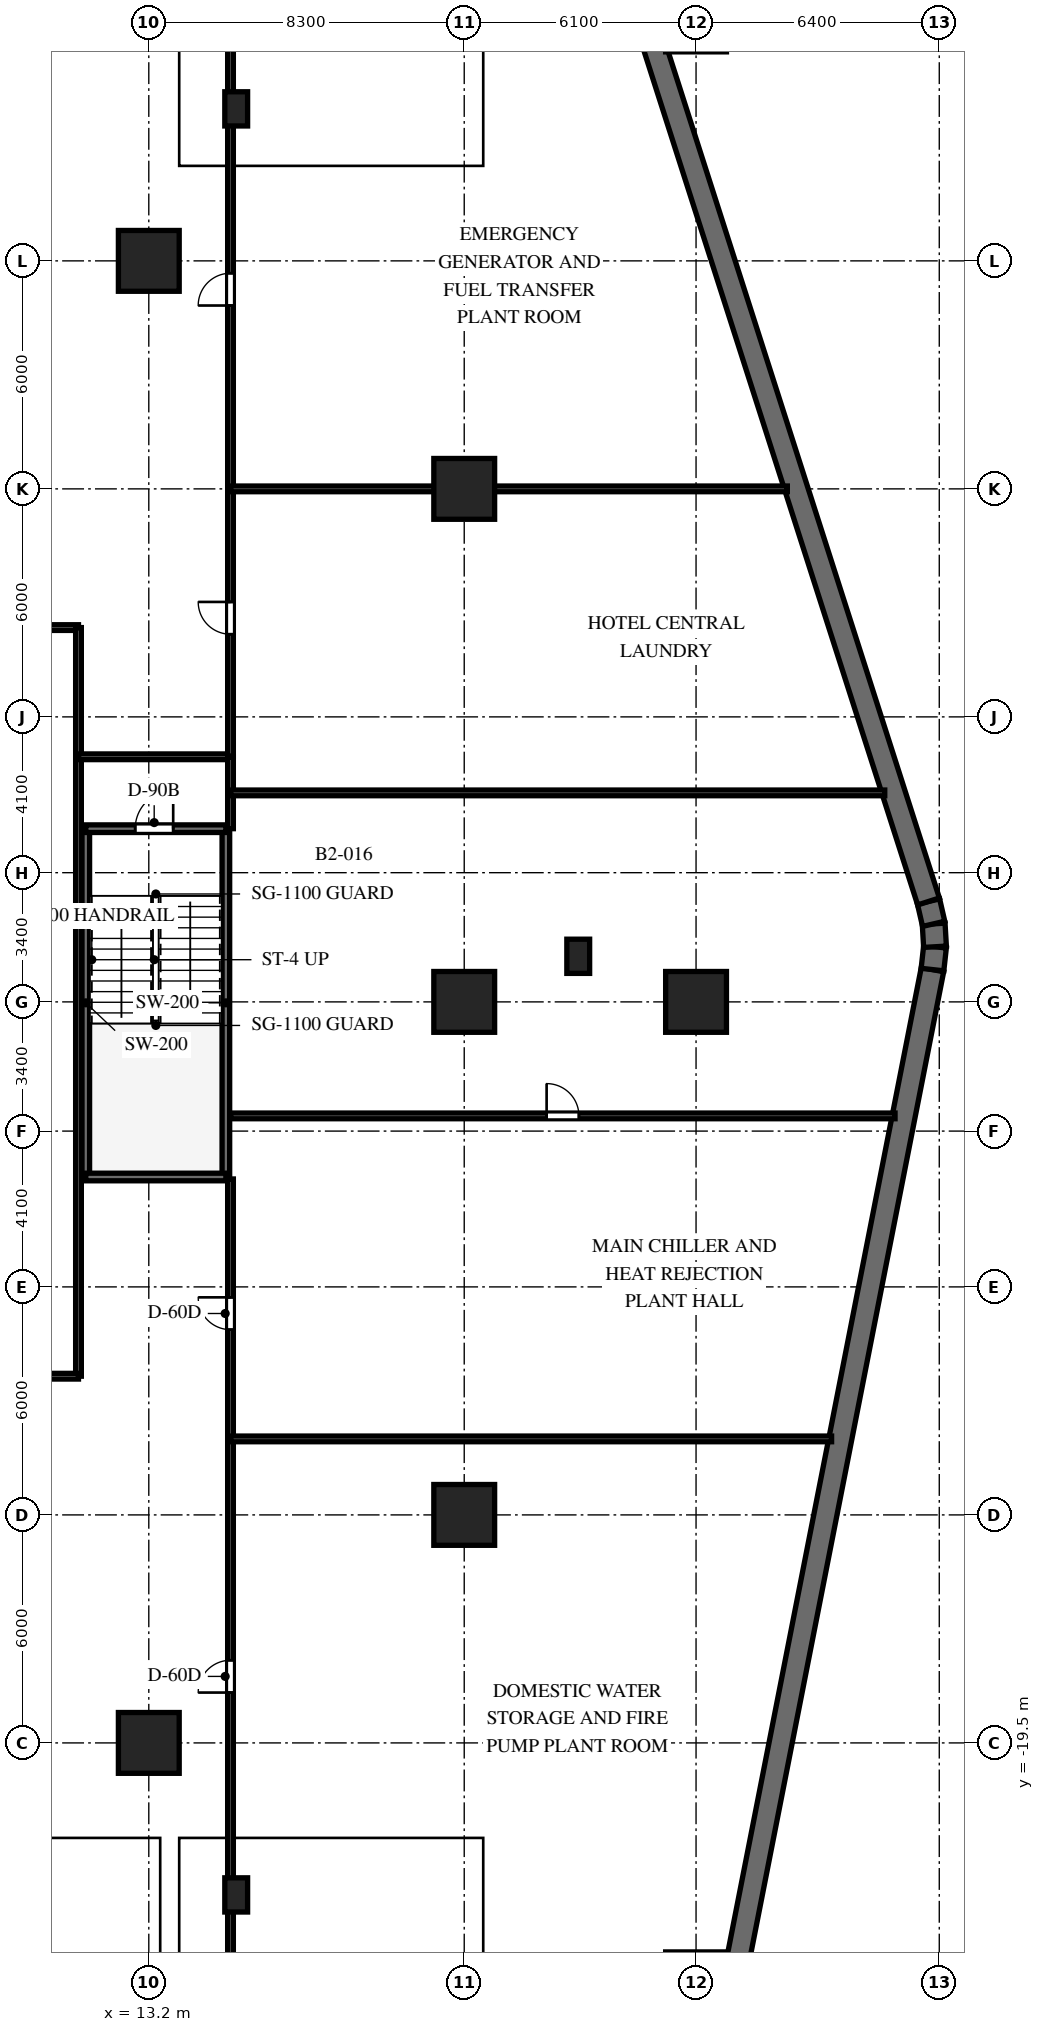
"""IFC4 building model, lengths in metres.
Left out: names, types, materials, properties, quantities, classifications, styles, units other than length and angle.
Written with IfcOpenShell. Run it as: python <this file> out.ifc"""

import sys

from ifc_helpers import new_model, si_unit, direction, frame, frame_2d, origin, origin_2d, place, context, subcontext, project, spatial, rectangle, extrude, element, fill, save


model = new_model("IFC4")
c1 = context("Model", 3, precision=1e-05, world=origin(), true_north=direction((0.0, 1.0)))
c2 = subcontext(c1, "Body", "Model", "MODEL_VIEW")
j1 = project(units=[si_unit("LENGTHUNIT", "METRE"), si_unit("PLANEANGLEUNIT", "RADIAN")], contexts=[c1])
p1 = place(None, origin())
s1 = spatial("IfcSite", under=j1, at=p1, CompositionType="ELEMENT")
p2 = place(p1, origin())
s2 = spatial("IfcBuilding", under=s1, at=p2, CompositionType="ELEMENT")
p3 = place(p2, frame((0.0, 0.0, -9.0)))
s3 = spatial("IfcBuildingStorey", under=s2, at=p3, CompositionType="ELEMENT", Elevation=-9.0)
for number, where, z_axis, x_axis in (
    (1, (11.542, -4.608, 0.0), (0.0, 0.0, 1.0), (0.0, 1.0, 0.0)),
    (2, (15.228, -4.608, 0.0), (0.0, 0.0, 1.0), (0.0, 1.0, 0.0)),
):
    element("IfcWall", number, at=place(p3, frame(where, z_axis=z_axis, x_axis=x_axis)), inside=s3, PredefinedType="SHEAR", context=c2, shape_type="SweptSolid", body=[
        extrude(rectangle(XDim=9.166, YDim=0.2, at=frame_2d((4.583, 0.0))), origin(), (0.0, 0.0, 1.0), 4.5),
    ])
p4 = place(p3, frame((11.542, -4.608, 0.0), z_axis=(0.0, 0.0, 1.0), x_axis=(1.0, 0.0, 0.0)))
e3 = element("IfcWall", 3, at=p4, inside=s3, PredefinedType="SHEAR", context=c2, shape_type="SweptSolid", body=[
    extrude(rectangle(XDim=3.686, YDim=0.2, at=frame_2d((1.843, 0.0))), origin(), (0.0, 0.0, 1.0), 4.5),
])
p5 = place(p3, frame((11.542, 4.558, 0.0), z_axis=(0.0, 0.0, 1.0), x_axis=(1.0, 0.0, 0.0)))
e4 = element("IfcWall", 4, at=p5, inside=s3, PredefinedType="SHEAR", context=c2, shape_type="SweptSolid", body=[
    extrude(rectangle(XDim=3.686, YDim=0.2, at=frame_2d((1.843, 0.0))), origin(), (0.0, 0.0, 1.0), 4.5),
])
p6 = place(p5, frame((1.3, 0.0, 0.0)))
e5 = element("IfcOpeningElement", 5, at=p6, cuts=e4, PredefinedType="OPENING", context=c2, shape_type="SweptSolid", body=[
    extrude(rectangle(XDim=1.0, YDim=2.15, at=frame_2d((0.5, 1.075))), frame((0.0, 0.11, 0.0), z_axis=(0.0, -1.0, 0.0), x_axis=(1.0, 0.0, 0.0)), (0.0, 0.0, 1.0), 0.22),
])
p7 = place(p3, frame((27.941, -29.094, 0.0), z_axis=(0.0, 0.0, 1.0), x_axis=(0.192705549984, 0.981256628515, 0.0)))
e6 = element("IfcWall", 6, at=p7, inside=s3, PredefinedType="SHEAR", context=c2, shape_type="SweptSolid", body=[
    extrude(rectangle(XDim=30.516, YDim=0.6, at=frame_2d((15.258, 0.0))), origin(), (0.0, 0.0, 1.0), 4.5),
])
p8 = place(p3, frame((33.821, 0.85, 0.0), z_axis=(0.0, 0.0, 1.0), x_axis=(0.109899357688, 0.993942720271, 0.0)))
e7 = element("IfcWall", 7, at=p8, inside=s3, PredefinedType="SHEAR", context=c2, shape_type="SweptSolid", body=[
    extrude(rectangle(XDim=0.604, YDim=0.6, at=frame_2d((0.302, 0.0))), origin(), (0.0, 0.0, 1.0), 4.5),
])
for number, where, z_axis, x_axis in (
    (8, (33.888, 1.451, 0.0), (0.0, 0.0, 1.0), (-0.058, 0.998, 0.0)),
    (9, (33.853, 2.054, 0.0), (0.0, 0.0, 1.0), (-0.224, 0.975, 0.0)),
):
    element("IfcWall", number, at=place(p3, frame(where, z_axis=z_axis, x_axis=x_axis)), inside=s3, PredefinedType="SHEAR", context=c2, shape_type="SweptSolid", body=[
        extrude(rectangle(XDim=0.604, YDim=0.6, at=frame_2d((0.302, 0.0))), origin(), (0.0, 0.0, 1.0), 4.5),
    ])
p9 = place(p3, frame((33.717, 2.643, 0.0), z_axis=(0.0, 0.0, 1.0), x_axis=(-0.305147622554, 0.952305060603, 0.0)))
e10 = element("IfcWall", 10, at=p9, inside=s3, PredefinedType="SHEAR", context=c2, shape_type="SweptSolid", body=[
    extrude(rectangle(XDim=28.201, YDim=0.6, at=frame_2d((14.101, 0.0))), origin(), (0.0, 0.0, 1.0), 4.5),
])
for number, where, z_axis, x_axis in (
    (11, (21.5, -13.5, 0.0), (0.0, 0.0, 1.0), (1.0, 0.0, 0.0)),
    (12, (21.5, 0.0, 0.0), (0.0, 0.0, 1.0), (1.0, 0.0, 0.0)),
    (13, (21.5, 13.5, 0.0), (0.0, 0.0, 1.0), (1.0, 0.0, 0.0)),
    (14, (13.2, -19.5, 0.0), (0.0, 0.0, 1.0), (1.0, 0.0, 0.0)),
    (15, (13.2, 19.5, 0.0), (0.0, 0.0, 1.0), (1.0, 0.0, 0.0)),
    (16, (27.6, 0.0, 0.0), (0.0, 0.0, 1.0), (1.0, 0.0, 0.0)),
):
    element("IfcColumn", number, at=place(p3, frame(where, z_axis=z_axis, x_axis=x_axis)), inside=s3, PredefinedType="COLUMN", context=c2, shape_type="SweptSolid", body=[
        extrude(rectangle(XDim=1.6, YDim=1.6, at=origin_2d()), origin(), (0.0, 0.0, 1.0), 4.5),
    ])
for number, where, z_axis, x_axis in (
    (17, (15.5, -23.5, 0.0), (0.0, 0.0, 1.0), (1.0, 0.0, 0.0)),
    (18, (24.5, 1.2, 0.0), (0.0, 0.0, 1.0), (1.0, 0.0, 0.0)),
    (19, (15.5, 23.5, 0.0), (0.0, 0.0, 1.0), (1.0, 0.0, 0.0)),
):
    element("IfcColumn", number, at=place(p3, frame(where, z_axis=z_axis, x_axis=x_axis)), inside=s3, PredefinedType="PILASTER", context=c2, shape_type="SweptSolid", body=[
        extrude(rectangle(XDim=0.6, YDim=0.9, at=origin_2d()), origin(), (0.0, 0.0, 1.0), 4.5),
    ])
p10 = place(p3, frame((-11.35, 9.85, 0.0), z_axis=(0.0, 0.0, 1.0), x_axis=(1.0, 0.0, 0.0)))
e20 = element("IfcWall", 20, at=p10, inside=s3, PredefinedType="PARTITIONING", context=c2, shape_type="SweptSolid", body=[
    extrude(rectangle(XDim=22.7, YDim=0.15, at=frame_2d((11.35, 0.0))), origin(), (0.0, 0.0, 1.0), 3.17),
])
p11 = place(p3, frame((11.35, 9.85, 0.0), z_axis=(0.0, 0.0, 1.0), x_axis=(0.0, -1.0, 0.0)))
e21 = element("IfcWall", 21, at=p11, inside=s3, PredefinedType="PARTITIONING", context=c2, shape_type="SweptSolid", body=[
    extrude(rectangle(XDim=19.7, YDim=0.15, at=frame_2d((9.85, 0.0))), origin(), (0.0, 0.0, 1.0), 3.17),
])
p12 = place(p3, frame((11.35, -9.85, 0.0), z_axis=(0.0, 0.0, 1.0), x_axis=(-1.0, 0.0, 0.0)))
e22 = element("IfcWall", 22, at=p12, inside=s3, PredefinedType="PARTITIONING", context=c2, shape_type="SweptSolid", body=[
    extrude(rectangle(XDim=22.7, YDim=0.15, at=frame_2d((11.35, 0.0))), origin(), (0.0, 0.0, 1.0), 3.17),
])
p13 = place(p3, frame((11.35, 6.45, 0.0), z_axis=(0.0, 0.0, 1.0), x_axis=(1.0, 0.0, 0.0)))
e23 = element("IfcWall", 23, at=p13, inside=s3, PredefinedType="PARTITIONING", context=c2, shape_type="SweptSolid", body=[
    extrude(rectangle(XDim=4.0, YDim=0.15, at=frame_2d((2.0, 0.0))), origin(), (0.0, 0.0, 1.0), 4.18),
])
p14 = place(p3, frame((15.35, 4.558, 0.0), z_axis=(0.0, 0.0, 1.0), x_axis=(0.0, 1.0, 0.0)))
e24 = element("IfcWall", 24, at=p14, inside=s3, PredefinedType="PARTITIONING", context=c2, shape_type="SweptSolid", body=[
    extrude(rectangle(XDim=1.892, YDim=0.15, at=frame_2d((0.946, 0.0))), origin(), (0.0, 0.0, 1.0), 4.18),
])
p15 = place(p3, frame((15.35, -25.5, 0.0), z_axis=(0.0, 0.0, 1.0), x_axis=(0.0, 1.0, 0.0)))
e25 = element("IfcWall", 25, at=p15, inside=s3, PredefinedType="PARTITIONING", context=c2, shape_type="SweptSolid", body=[
    extrude(rectangle(XDim=20.84, YDim=0.15, at=frame_2d((10.42, 0.0))), origin(), (0.0, 0.0, 1.0), 3.17),
])
p16 = place(p15, frame((7.325, 0.0, 0.0)))
e26 = element("IfcOpeningElement", 26, at=p16, cuts=e25, PredefinedType="OPENING", context=c2, shape_type="SweptSolid", body=[
    extrude(rectangle(XDim=0.85, YDim=2.03, at=frame_2d((0.425, 1.015))), frame((0.0, 0.085, 0.0), z_axis=(0.0, -1.0, 0.0), x_axis=(1.0, 0.0, 0.0)), (0.0, 0.0, 1.0), 0.17),
])
p17 = place(p15, frame((16.875, 0.0, 0.0)))
e27 = element("IfcOpeningElement", 27, at=p17, cuts=e25, PredefinedType="OPENING", context=c2, shape_type="SweptSolid", body=[
    extrude(rectangle(XDim=0.85, YDim=2.03, at=frame_2d((0.425, 1.015))), frame((0.0, 0.085, 0.0), z_axis=(0.0, -1.0, 0.0), x_axis=(1.0, 0.0, 0.0)), (0.0, 0.0, 1.0), 0.17),
])
p18 = place(p3, frame((15.35, 6.46, 0.0), z_axis=(0.0, 0.0, 1.0), x_axis=(0.0, 1.0, 0.0)))
e28 = element("IfcWall", 28, at=p18, inside=s3, PredefinedType="PARTITIONING", context=c2, shape_type="SweptSolid", body=[
    extrude(rectangle(XDim=19.04, YDim=0.15, at=frame_2d((9.52, 0.0))), origin(), (0.0, 0.0, 1.0), 3.17),
])
p19 = place(p18, frame((3.215, 0.0, 0.0)))
e29 = element("IfcOpeningElement", 29, at=p19, cuts=e28, PredefinedType="OPENING", context=c2, shape_type="SweptSolid", body=[
    extrude(rectangle(XDim=0.85, YDim=2.03, at=frame_2d((0.425, 1.015))), frame((0.0, 0.085, 0.0), z_axis=(0.0, -1.0, 0.0), x_axis=(1.0, 0.0, 0.0)), (0.0, 0.0, 1.0), 0.17),
])
p20 = place(p18, frame((11.865, 0.0, 0.0)))
e30 = element("IfcOpeningElement", 30, at=p20, cuts=e28, PredefinedType="OPENING", context=c2, shape_type="SweptSolid", body=[
    extrude(rectangle(XDim=0.85, YDim=2.03, at=frame_2d((0.425, 1.015))), frame((0.0, 0.085, 0.0), z_axis=(0.0, -1.0, 0.0), x_axis=(1.0, 0.0, 0.0)), (0.0, 0.0, 1.0), 0.17),
])
p21 = place(p3, frame((15.35, -11.5, 0.0), z_axis=(0.0, 0.0, 1.0), x_axis=(1.0, 0.0, 0.0)))
e31 = element("IfcWall", 31, at=p21, inside=s3, PredefinedType="PARTITIONING", context=c2, shape_type="SweptSolid", body=[
    extrude(rectangle(XDim=15.816, YDim=0.15, at=frame_2d((7.908, 0.0))), origin(), (0.0, 0.0, 1.0), 3.17),
])
p22 = place(p3, frame((15.35, -3.0, 0.0), z_axis=(0.0, 0.0, 1.0), x_axis=(1.0, 0.0, 0.0)))
e32 = element("IfcWall", 32, at=p22, inside=s3, PredefinedType="PARTITIONING", context=c2, shape_type="SweptSolid", body=[
    extrude(rectangle(XDim=17.486, YDim=0.15, at=frame_2d((8.743, 0.0))), origin(), (0.0, 0.0, 1.0), 3.17),
])
p23 = place(p22, frame((8.318, 0.0, 0.0)))
e33 = element("IfcOpeningElement", 33, at=p23, cuts=e32, PredefinedType="OPENING", context=c2, shape_type="SweptSolid", body=[
    extrude(rectangle(XDim=0.85, YDim=2.03, at=frame_2d((0.425, 1.015))), frame((0.0, 0.085, 0.0), z_axis=(0.0, -1.0, 0.0), x_axis=(1.0, 0.0, 0.0)), (0.0, 0.0, 1.0), 0.17),
])
p24 = place(p3, frame((15.35, 5.5, 0.0), z_axis=(0.0, 0.0, 1.0), x_axis=(1.0, 0.0, 0.0)))
e34 = element("IfcWall", 34, at=p24, inside=s3, PredefinedType="PARTITIONING", context=c2, shape_type="SweptSolid", body=[
    extrude(rectangle(XDim=17.215, YDim=0.15, at=frame_2d((8.607, 0.0))), origin(), (0.0, 0.0, 1.0), 3.17),
])
p25 = place(p3, frame((15.35, 13.5, 0.0), z_axis=(0.0, 0.0, 1.0), x_axis=(1.0, 0.0, 0.0)))
e35 = element("IfcWall", 35, at=p25, inside=s3, PredefinedType="PARTITIONING", context=c2, shape_type="SweptSolid", body=[
    extrude(rectangle(XDim=14.652, YDim=0.15, at=frame_2d((7.326, 0.0))), origin(), (0.0, 0.0, 1.0), 3.17),
])
p26 = place(p6, origin())
e36 = element("IfcDoor", 36, at=p26, inside=s3, OperationType="SINGLE_SWING_RIGHT", PredefinedType="DOOR", context=c2, shape_type="SweptSolid", body=[
    extrude(rectangle(XDim=1.0, YDim=2.15, at=frame_2d((0.5, 1.075))), frame((0.0, 0.025, 0.0), z_axis=(0.0, -1.0, 0.0), x_axis=(1.0, 0.0, 0.0)), (0.0, 0.0, 1.0), 0.05),
])
fill(e5, e36)
p27 = place(p16, origin())
e37 = element("IfcDoor", 37, at=p27, inside=s3, OperationType="SINGLE_SWING_LEFT", PredefinedType="DOOR", context=c2, shape_type="SweptSolid", body=[
    extrude(rectangle(XDim=0.85, YDim=2.03, at=frame_2d((0.425, 1.015))), frame((0.0, 0.025, 0.0), z_axis=(0.0, -1.0, 0.0), x_axis=(1.0, 0.0, 0.0)), (0.0, 0.0, 1.0), 0.05),
])
fill(e26, e37)
p28 = place(p17, origin())
e38 = element("IfcDoor", 38, at=p28, inside=s3, OperationType="SINGLE_SWING_RIGHT", PredefinedType="DOOR", context=c2, shape_type="SweptSolid", body=[
    extrude(rectangle(XDim=0.85, YDim=2.03, at=frame_2d((0.425, 1.015))), frame((0.0, 0.025, 0.0), z_axis=(0.0, -1.0, 0.0), x_axis=(1.0, 0.0, 0.0)), (0.0, 0.0, 1.0), 0.05),
])
fill(e27, e38)
p29 = place(p23, origin())
e39 = element("IfcDoor", 39, at=p29, inside=s3, OperationType="SINGLE_SWING_LEFT", PredefinedType="DOOR", context=c2, shape_type="SweptSolid", body=[
    extrude(rectangle(XDim=0.85, YDim=2.03, at=frame_2d((0.425, 1.015))), frame((0.0, 0.025, 0.0), z_axis=(0.0, -1.0, 0.0), x_axis=(1.0, 0.0, 0.0)), (0.0, 0.0, 1.0), 0.05),
])
fill(e33, e39)
p30 = place(p19, origin())
e40 = element("IfcDoor", 40, at=p30, inside=s3, OperationType="SINGLE_SWING_RIGHT", PredefinedType="DOOR", context=c2, shape_type="SweptSolid", body=[
    extrude(rectangle(XDim=0.85, YDim=2.03, at=frame_2d((0.425, 1.015))), frame((0.0, 0.025, 0.0), z_axis=(0.0, -1.0, 0.0), x_axis=(1.0, 0.0, 0.0)), (0.0, 0.0, 1.0), 0.05),
])
fill(e29, e40)
p31 = place(p20, origin())
e41 = element("IfcDoor", 41, at=p31, inside=s3, OperationType="SINGLE_SWING_LEFT", PredefinedType="DOOR", context=c2, shape_type="SweptSolid", body=[
    extrude(rectangle(XDim=0.85, YDim=2.03, at=frame_2d((0.425, 1.015))), frame((0.0, 0.025, 0.0), z_axis=(0.0, -1.0, 0.0), x_axis=(1.0, 0.0, 0.0)), (0.0, 0.0, 1.0), 0.05),
])
fill(e30, e41)
save(model, sys.argv[1])
